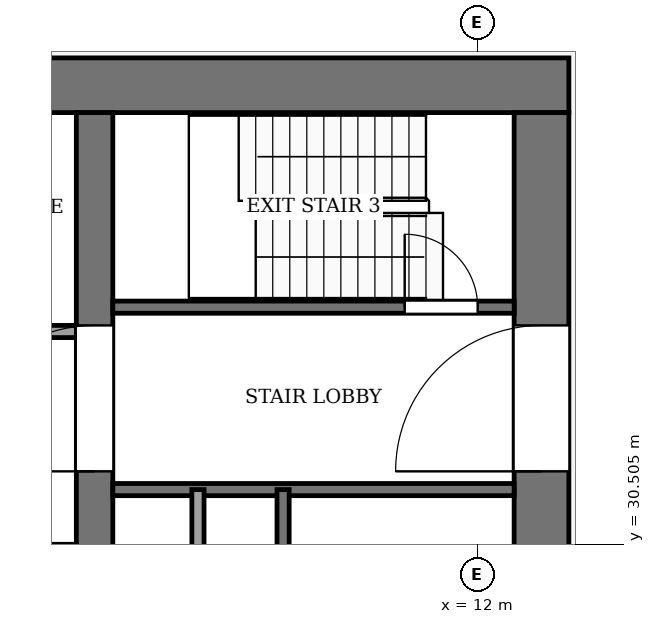
"""IFC4 building model, lengths in metres.
Left out: names, types, materials, properties, quantities, classifications, styles, units other than length and angle.
Written with IfcOpenShell. Run it as: python <this file> out.ifc"""

import sys

from ifc_helpers import new_model, si_unit, direction, frame, frame_2d, origin, place, context, subcontext, project, spatial, rectangle, extrude, element, fill, save


model = new_model("IFC4")
c1 = context("Model", 3, precision=1e-05, world=origin(), true_north=direction((0.0, 1.0)))
c2 = subcontext(c1, "Body", "Model", "MODEL_VIEW")
j1 = project(units=[si_unit("LENGTHUNIT", "METRE"), si_unit("PLANEANGLEUNIT", "RADIAN")], contexts=[c1])
p1 = place(None, origin())
s1 = spatial("IfcSite", under=j1, at=p1, CompositionType="ELEMENT")
p2 = place(p1, origin())
s2 = spatial("IfcBuilding", under=s1, at=p2, CompositionType="ELEMENT")
p3 = place(p2, frame((0.0, 0.0, 194.0)))
s3 = spatial("IfcBuildingStorey", under=s2, at=p3, CompositionType="ELEMENT", Elevation=194.0)
p4 = place(p3, frame((-13.5, 38.05, -0.13), z_axis=(0.0, 0.0, 1.0), x_axis=(1.0, 0.0, 0.0)))
e1 = element("IfcWall", 1, at=p4, inside=s3, PredefinedType="SHEAR", context=c2, shape_type="SweptSolid", body=[
    extrude(rectangle(XDim=27.0, YDim=0.9, at=frame_2d((13.5, 0.0))), origin(), (0.0, 0.0, 1.0), 4.0),
])
p5 = place(p3, frame((13.05, 18.4, -0.13), z_axis=(0.0, 0.0, 1.0), x_axis=(0.0, 1.0, 0.0)))
e2 = element("IfcWall", 2, at=p5, inside=s3, PredefinedType="SHEAR", context=c2, shape_type="SweptSolid", body=[
    extrude(rectangle(XDim=19.2, YDim=0.9, at=frame_2d((9.6, 0.0))), origin(), (0.0, 0.0, 1.0), 4.0),
])
p6 = place(p5, frame((2.8, 0.0, 0.13)))
e3 = element("IfcOpeningElement", 3, at=p6, cuts=e2, PredefinedType="OPENING", context=c2, shape_type="SweptSolid", body=[
    extrude(rectangle(XDim=2.4, YDim=2.4, at=frame_2d((1.2, 1.2))), frame((0.0, 0.46, 0.0), z_axis=(0.0, -1.0, 0.0), x_axis=(1.0, 0.0, 0.0)), (0.0, 0.0, 1.0), 0.92),
])
p7 = place(p5, frame((13.3, 0.0, 0.13)))
e4 = element("IfcOpeningElement", 4, at=p7, cuts=e2, PredefinedType="OPENING", context=c2, shape_type="SweptSolid", body=[
    extrude(rectangle(XDim=2.4, YDim=2.4, at=frame_2d((1.2, 1.2))), frame((0.0, 0.46, 0.0), z_axis=(0.0, -1.0, 0.0), x_axis=(1.0, 0.0, 0.0)), (0.0, 0.0, 1.0), 0.92),
])
p8 = place(p3, frame((5.7, 18.4, -0.13), z_axis=(0.0, 0.0, 1.0), x_axis=(0.0, 1.0, 0.0)))
e5 = element("IfcWall", 5, at=p8, inside=s3, PredefinedType="SHEAR", context=c2, shape_type="SweptSolid", body=[
    extrude(rectangle(XDim=19.2, YDim=0.6, at=frame_2d((9.6, 0.0))), origin(), (0.0, 0.0, 1.0), 4.0),
])
p9 = place(p8, frame((13.3, 0.0, 0.13)))
e6 = element("IfcOpeningElement", 6, at=p9, cuts=e5, PredefinedType="OPENING", context=c2, shape_type="SweptSolid", body=[
    extrude(rectangle(XDim=2.4, YDim=2.4, at=frame_2d((1.2, 1.2))), frame((0.0, 0.31, 0.0), z_axis=(0.0, -1.0, 0.0), x_axis=(1.0, 0.0, 0.0)), (0.0, 0.0, 1.0), 0.62),
])
p10 = place(p3, frame((6.0, 31.4, 0.0), z_axis=(0.0, 0.0, 1.0), x_axis=(1.0, 0.0, 0.0)))
e7 = element("IfcWall", 7, at=p10, inside=s3, PredefinedType="PARTITIONING", context=c2, shape_type="SweptSolid", body=[
    extrude(rectangle(XDim=6.6, YDim=0.2, at=frame_2d((3.3, 0.0))), origin(), (0.0, 0.0, 1.0), 3.87),
])
p11 = place(p3, frame((-5.4, 34.0, 0.0), z_axis=(0.0, 0.0, 1.0), x_axis=(1.0, 0.0, 0.0)))
e8 = element("IfcWall", 8, at=p11, inside=s3, PredefinedType="PARTITIONING", context=c2, shape_type="SweptSolid", body=[
    extrude(rectangle(XDim=10.8, YDim=0.2, at=frame_2d((5.4, 0.0))), origin(), (0.0, 0.0, 1.0), 3.87),
])
p12 = place(p11, frame((6.15, 0.0, 0.0)))
e9 = element("IfcOpeningElement", 9, at=p12, cuts=e8, PredefinedType="OPENING", context=c2, shape_type="SweptSolid", body=[
    extrude(rectangle(XDim=1.2, YDim=2.2, at=frame_2d((0.6, 1.1))), frame((0.0, 0.11, 0.0), z_axis=(0.0, -1.0, 0.0), x_axis=(1.0, 0.0, 0.0)), (0.0, 0.0, 1.0), 0.22),
])
p13 = place(p11, frame((8.95, 0.0, 0.0)))
e10 = element("IfcOpeningElement", 10, at=p13, cuts=e8, PredefinedType="OPENING", context=c2, shape_type="SweptSolid", body=[
    extrude(rectangle(XDim=1.0, YDim=2.1, at=frame_2d((0.5, 1.05))), frame((0.0, 0.11, 0.0), z_axis=(0.0, -1.0, 0.0), x_axis=(1.0, 0.0, 0.0)), (0.0, 0.0, 1.0), 0.22),
])
p14 = place(p3, frame((6.0, 34.4, 0.0), z_axis=(0.0, 0.0, 1.0), x_axis=(1.0, 0.0, 0.0)))
e11 = element("IfcWall", 11, at=p14, inside=s3, PredefinedType="PARTITIONING", context=c2, shape_type="SweptSolid", body=[
    extrude(rectangle(XDim=6.6, YDim=0.2, at=frame_2d((3.3, 0.0))), origin(), (0.0, 0.0, 1.0), 3.87),
])
p15 = place(p14, frame((4.8, 0.0, 0.0)))
e12 = element("IfcOpeningElement", 12, at=p15, cuts=e11, PredefinedType="OPENING", context=c2, shape_type="SweptSolid", body=[
    extrude(rectangle(XDim=1.2, YDim=2.2, at=frame_2d((0.6, 1.1))), frame((0.0, 0.11, 0.0), z_axis=(0.0, -1.0, 0.0), x_axis=(1.0, 0.0, 0.0)), (0.0, 0.0, 1.0), 0.22),
])
for number, where, z_axis, x_axis in (
    (13, (7.4, 24.0, 0.0), (0.0, 0.0, 1.0), (0.0, 1.0, 0.0)),
    (14, (8.8, 24.0, 0.0), (0.0, 0.0, 1.0), (0.0, 1.0, 0.0)),
):
    element("IfcWall", number, at=place(p3, frame(where, z_axis=z_axis, x_axis=x_axis)), inside=s3, PredefinedType="PARTITIONING", context=c2, shape_type="SweptSolid", body=[
        extrude(rectangle(XDim=7.4, YDim=0.2, at=frame_2d((3.7, 0.0))), origin(), (0.0, 0.0, 1.0), 3.87),
    ])
p16 = place(p15, origin())
e15 = element("IfcDoor", 15, at=p16, inside=s3, OperationType="SINGLE_SWING_RIGHT", PredefinedType="DOOR", context=c2, shape_type="SweptSolid", body=[
    extrude(rectangle(XDim=1.2, YDim=2.2, at=frame_2d((0.6, 1.1))), frame((0.0, 0.025, 0.0), z_axis=(0.0, -1.0, 0.0), x_axis=(1.0, 0.0, 0.0)), (0.0, 0.0, 1.0), 0.05),
])
fill(e12, e15)
p17 = place(p9, origin())
e16 = element("IfcDoor", 16, at=p17, inside=s3, OperationType="DOUBLE_DOOR_SINGLE_SWING", PredefinedType="DOOR", context=c2, shape_type="SweptSolid", body=[
    extrude(rectangle(XDim=2.4, YDim=2.4, at=frame_2d((1.2, 1.2))), frame((0.0, 0.025, 0.0), z_axis=(0.0, -1.0, 0.0), x_axis=(1.0, 0.0, 0.0)), (0.0, 0.0, 1.0), 0.05),
])
fill(e6, e16)
p18 = place(p7, origin())
e17 = element("IfcDoor", 17, at=p18, inside=s3, OperationType="DOUBLE_DOOR_SINGLE_SWING", PredefinedType="DOOR", context=c2, shape_type="SweptSolid", body=[
    extrude(rectangle(XDim=2.4, YDim=2.4, at=frame_2d((1.2, 1.2))), frame((0.0, 0.025, 0.0), z_axis=(0.0, -1.0, 0.0), x_axis=(1.0, 0.0, 0.0)), (0.0, 0.0, 1.0), 0.05),
])
fill(e4, e17)
save(model, sys.argv[1])
